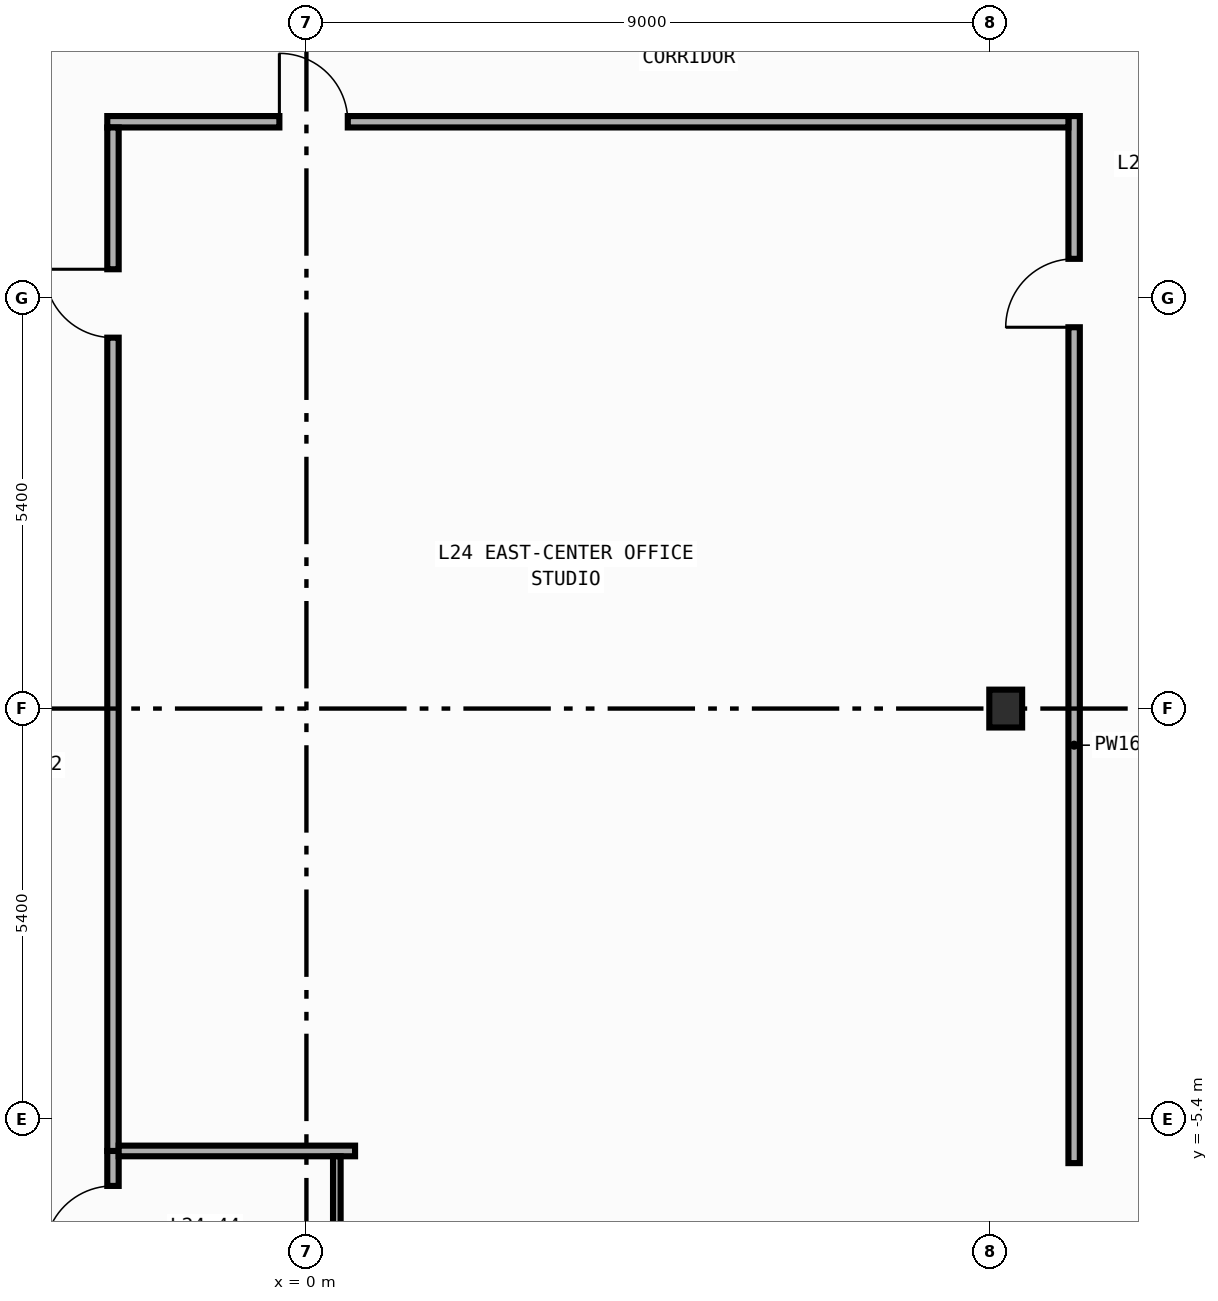
"""IFC4 building model, lengths in metres.
Left out: names, types, materials, properties, quantities, classifications, styles, units other than length and angle.
Written with IfcOpenShell. Run it as: python <this file> out.ifc"""

import sys

from ifc_helpers import new_model, si_unit, direction, frame, frame_2d, origin, origin_2d, place, context, subcontext, project, spatial, rectangle, i_section, extrude, element, fill, save


model = new_model("IFC4")
c1 = context("Model", 3, precision=1e-05, world=origin(), true_north=direction((0.0, 1.0)))
c2 = subcontext(c1, "Body", "Model", "MODEL_VIEW")
j1 = project(units=[si_unit("LENGTHUNIT", "METRE"), si_unit("PLANEANGLEUNIT", "RADIAN")], contexts=[c1])
p1 = place(None, origin())
s1 = spatial("IfcSite", under=j1, at=p1, CompositionType="ELEMENT")
p2 = place(p1, origin())
s2 = spatial("IfcBuilding", under=s1, at=p2, CompositionType="ELEMENT")
p3 = place(p2, frame((0.0, 0.0, 105.8)))
s3 = spatial("IfcBuildingStorey", under=s2, at=p3, CompositionType="ELEMENT", Elevation=105.8)
p4 = place(p3, frame((9.2, 0.0, 0.0), z_axis=(0.0, 0.0, 1.0), x_axis=(1.0, 0.0, 0.0)))
e1 = element("IfcColumn", 1, at=p4, inside=s3, PredefinedType="COLUMN", context=c2, shape_type="SweptSolid", body=[
    extrude(i_section(OverallWidth=0.432, OverallDepth=0.498, WebThickness=0.045, FlangeThickness=0.07, FilletRadius=0.022, at=origin_2d()), origin(), (0.0, 0.0, 1.0), 4.2),
])
p5 = place(p3, frame((10.1, -5.98, 0.0), z_axis=(0.0, 0.0, 1.0), x_axis=(0.0, 1.0, 0.0)))
e2 = element("IfcWall", 2, at=p5, inside=s3, PredefinedType="PARTITIONING", context=c2, shape_type="SweptSolid", body=[
    extrude(rectangle(XDim=13.775, YDim=0.15, at=frame_2d((6.887, 0.0))), origin(), (0.0, 0.0, 1.0), 3.94),
])
p6 = place(p5, frame((10.997, 0.0, 0.0)))
e3 = element("IfcOpeningElement", 3, at=p6, cuts=e2, PredefinedType="OPENING", context=c2, shape_type="SweptSolid", body=[
    extrude(rectangle(XDim=0.9, YDim=2.15, at=frame_2d((0.45, 1.075))), frame((0.0, 0.085, 0.0), z_axis=(0.0, -1.0, 0.0), x_axis=(1.0, 0.0, 0.0)), (0.0, 0.0, 1.0), 0.17),
])
p7 = place(p3, frame((-2.62, 7.72, 0.0), z_axis=(0.0, 0.0, 1.0), x_axis=(1.0, 0.0, 0.0)))
e4 = element("IfcWall", 4, at=p7, inside=s3, PredefinedType="PARTITIONING", context=c2, shape_type="SweptSolid", body=[
    extrude(rectangle(XDim=12.645, YDim=0.15, at=frame_2d((6.323, 0.0))), origin(), (0.0, 0.0, 1.0), 3.94),
])
p8 = place(p7, frame((2.264, 0.0, 0.0)))
e5 = element("IfcOpeningElement", 5, at=p8, cuts=e4, PredefinedType="OPENING", context=c2, shape_type="SweptSolid", body=[
    extrude(rectangle(XDim=0.9, YDim=2.15, at=frame_2d((0.45, 1.075))), frame((0.0, 0.085, 0.0), z_axis=(0.0, -1.0, 0.0), x_axis=(1.0, 0.0, 0.0)), (0.0, 0.0, 1.0), 0.17),
])
p9 = place(p3, frame((-2.545, -8.645, 0.0), z_axis=(0.0, 0.0, 1.0), x_axis=(0.0, 1.0, 0.0)))
e6 = element("IfcWall", 6, at=p9, inside=s3, PredefinedType="PARTITIONING", context=c2, shape_type="SweptSolid", body=[
    extrude(rectangle(XDim=2.825, YDim=0.15, at=frame_2d((1.413, 0.0))), origin(), (0.0, 0.0, 1.0), 3.94),
])
p10 = place(p9, frame((1.465, 0.0, 0.0)))
e7 = element("IfcOpeningElement", 7, at=p10, cuts=e6, PredefinedType="OPENING", context=c2, shape_type="SweptSolid", body=[
    extrude(rectangle(XDim=0.9, YDim=2.15, at=frame_2d((0.45, 1.075))), frame((0.0, 0.085, 0.0), z_axis=(0.0, -1.0, 0.0), x_axis=(1.0, 0.0, 0.0)), (0.0, 0.0, 1.0), 0.17),
])
p11 = place(p3, frame((-2.545, -5.82, 0.0), z_axis=(0.0, 0.0, 1.0), x_axis=(0.0, 1.0, 0.0)))
e8 = element("IfcWall", 8, at=p11, inside=s3, PredefinedType="PARTITIONING", context=c2, shape_type="SweptSolid", body=[
    extrude(rectangle(XDim=13.465, YDim=0.15, at=frame_2d((6.732, 0.0))), origin(), (0.0, 0.0, 1.0), 3.94),
])
p12 = place(p11, frame((10.7, 0.0, 0.0)))
e9 = element("IfcOpeningElement", 9, at=p12, cuts=e8, PredefinedType="OPENING", context=c2, shape_type="SweptSolid", body=[
    extrude(rectangle(XDim=0.9, YDim=2.15, at=frame_2d((0.45, 1.075))), frame((0.0, 0.085, 0.0), z_axis=(0.0, -1.0, 0.0), x_axis=(1.0, 0.0, 0.0)), (0.0, 0.0, 1.0), 0.17),
])
p13 = place(p3, frame((-2.47, -5.82, 0.0), z_axis=(0.0, 0.0, 1.0), x_axis=(1.0, 0.0, 0.0)))
e10 = element("IfcWall", 10, at=p13, inside=s3, PredefinedType="PARTITIONING", context=c2, shape_type="SweptSolid", body=[
    extrude(rectangle(XDim=3.11, YDim=0.14, at=frame_2d((1.555, 0.0))), origin(), (0.0, 0.0, 1.0), 3.94),
])
p14 = place(p3, frame((0.4, -5.89, 0.0), z_axis=(0.0, 0.0, 1.0), x_axis=(0.0, -1.0, 0.0)))
e11 = element("IfcWall", 11, at=p14, inside=s3, PredefinedType="PARTITIONING", context=c2, shape_type="SweptSolid", body=[
    extrude(rectangle(XDim=2.755, YDim=0.1, at=frame_2d((1.377, 0.0))), origin(), (0.0, 0.0, 1.0), 3.94),
])
p15 = place(p6, origin())
e12 = element("IfcDoor", 12, at=p15, inside=s3, OperationType="SINGLE_SWING_LEFT", PredefinedType="DOOR", context=c2, shape_type="SweptSolid", body=[
    extrude(rectangle(XDim=0.9, YDim=2.15, at=frame_2d((0.45, 1.075))), frame((0.0, 0.025, 0.0), z_axis=(0.0, -1.0, 0.0), x_axis=(1.0, 0.0, 0.0)), (0.0, 0.0, 1.0), 0.05),
])
fill(e3, e12)
p16 = place(p8, origin())
e13 = element("IfcDoor", 13, at=p16, inside=s3, OperationType="SINGLE_SWING_LEFT", PredefinedType="DOOR", context=c2, shape_type="SweptSolid", body=[
    extrude(rectangle(XDim=0.9, YDim=2.15, at=frame_2d((0.45, 1.075))), frame((0.0, 0.025, 0.0), z_axis=(0.0, -1.0, 0.0), x_axis=(1.0, 0.0, 0.0)), (0.0, 0.0, 1.0), 0.05),
])
fill(e5, e13)
p17 = place(p10, origin())
e14 = element("IfcDoor", 14, at=p17, inside=s3, OperationType="SINGLE_SWING_LEFT", PredefinedType="DOOR", context=c2, shape_type="SweptSolid", body=[
    extrude(rectangle(XDim=0.9, YDim=2.15, at=frame_2d((0.45, 1.075))), frame((0.0, 0.025, 0.0), z_axis=(0.0, -1.0, 0.0), x_axis=(1.0, 0.0, 0.0)), (0.0, 0.0, 1.0), 0.05),
])
fill(e7, e14)
p18 = place(p12, origin())
e15 = element("IfcDoor", 15, at=p18, inside=s3, OperationType="SINGLE_SWING_RIGHT", PredefinedType="DOOR", context=c2, shape_type="SweptSolid", body=[
    extrude(rectangle(XDim=0.9, YDim=2.15, at=frame_2d((0.45, 1.075))), frame((0.0, 0.025, 0.0), z_axis=(0.0, -1.0, 0.0), x_axis=(1.0, 0.0, 0.0)), (0.0, 0.0, 1.0), 0.05),
])
fill(e9, e15)
save(model, sys.argv[1])
